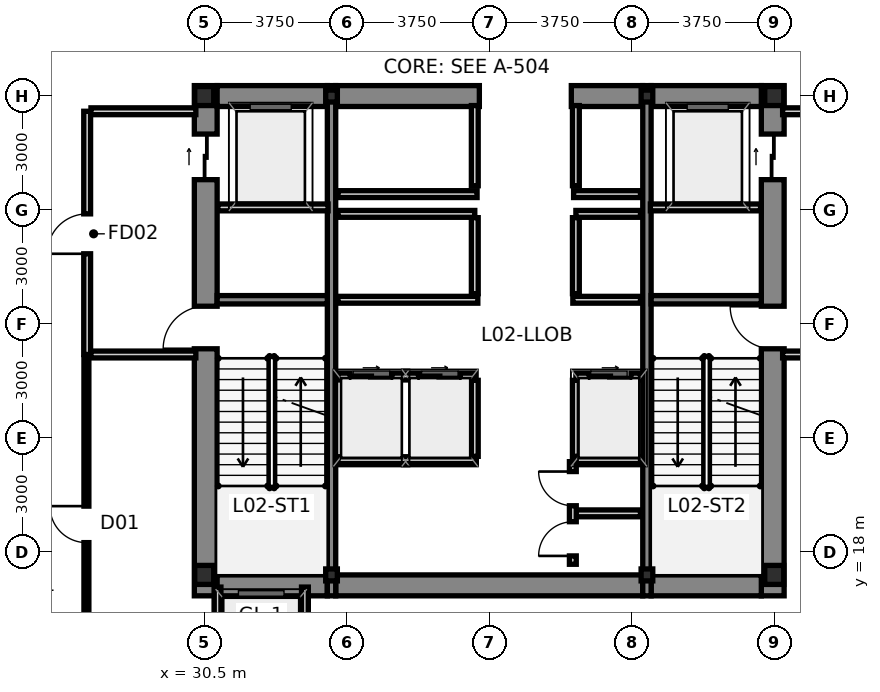
"""IFC4 building model, lengths in metres.
Left out: names, types, materials, properties, quantities, classifications, styles, units other than length and angle.
Written with IfcOpenShell. Run it as: python <this file> out.ifc"""

import sys

from ifc_helpers import new_model, si_unit, direction, frame, frame_2d, origin, origin_2d, place, context, subcontext, project, spatial, rectangle, i_section, extrude, source, transform, mapped, element, fill, save


model = new_model("IFC4")
c1 = context("Model", 3, precision=1e-05, world=origin(), true_north=direction((0.0, 1.0)))
c2 = subcontext(c1, "Body", "Model", "MODEL_VIEW")
j1 = project(units=[si_unit("LENGTHUNIT", "METRE"), si_unit("PLANEANGLEUNIT", "RADIAN")], contexts=[c1])
p1 = place(None, origin())
s1 = spatial("IfcSite", under=j1, at=p1, CompositionType="ELEMENT")
p2 = place(p1, origin())
s2 = spatial("IfcBuilding", under=s1, at=p2, CompositionType="ELEMENT")
p3 = place(p2, frame((0.0, 0.0, 10.2)))
s3 = spatial("IfcBuildingStorey", under=s2, at=p3, CompositionType="ELEMENT", Elevation=10.2)
m1 = source(origin(), c2, "Body", "SweptSolid", [
    extrude(i_section(OverallWidth=0.5, OverallDepth=0.5, WebThickness=0.028, FlangeThickness=0.04, at=origin_2d()), origin(), (0.0, 0.0, 1.0), 4.5),
])
for number, where, z_axis, x_axis in (
    (1, (30.5, 17.4, 0.0), (0.0, 0.0, 1.0), (1.0, 0.0, 0.0)),
    (2, (45.5, 17.4, 0.0), (0.0, 0.0, 1.0), (1.0, 0.0, 0.0)),
    (3, (45.5, 30.0, 0.0), (0.0, 0.0, 1.0), (1.0, 0.0, 0.0)),
    (4, (30.5, 30.0, 0.0), (0.0, 0.0, 1.0), (1.0, 0.0, 0.0)),
):
    element("IfcColumn", number, at=place(p3, frame(where, z_axis=z_axis, x_axis=x_axis)), inside=s3, PredefinedType="COLUMN", context=c2, shape_type="MappedRepresentation", body=[
        mapped(m1, transform((0.0, 0.0, 0.0), scale=1.0)),
    ])
m2 = source(origin(), c2, "Body", "SweptSolid", [
    extrude(i_section(OverallWidth=0.307, OverallDepth=0.315, WebThickness=0.012, FlangeThickness=0.019, at=origin_2d()), origin(), (0.0, 0.0, 1.0), 4.5),
])
for number, where, z_axis, x_axis in (
    (5, (33.85, 17.4, 0.0), (0.0, 0.0, 1.0), (1.0, 0.0, 0.0)),
    (6, (42.15, 17.4, 0.0), (0.0, 0.0, 1.0), (1.0, 0.0, 0.0)),
    (7, (33.85, 30.0, 0.0), (0.0, 0.0, 1.0), (1.0, 0.0, 0.0)),
    (8, (42.15, 30.0, 0.0), (0.0, 0.0, 1.0), (1.0, 0.0, 0.0)),
):
    element("IfcColumn", number, at=place(p3, frame(where, z_axis=z_axis, x_axis=x_axis)), inside=s3, PredefinedType="COLUMN", context=c2, shape_type="MappedRepresentation", body=[
        mapped(m2, transform((0.0, 0.0, 0.0), scale=1.0)),
    ])
p4 = place(p3, frame((30.54, 16.85, 0.0), z_axis=(0.0, 0.0, 1.0), x_axis=(0.0, 1.0, 0.0)))
e9 = element("IfcWall", 9, at=p4, inside=s3, PredefinedType="SHEAR", context=c2, shape_type="SweptSolid", body=[
    extrude(rectangle(XDim=13.425, YDim=0.6, at=frame_2d((6.712, 0.0))), origin(), (0.0, 0.0, 1.0), 4.5),
])
p5 = place(p4, frame((6.5, 0.0, 0.0)))
e10 = element("IfcOpeningElement", 10, at=p5, cuts=e9, PredefinedType="OPENING", context=c2, shape_type="SweptSolid", body=[
    extrude(rectangle(XDim=1.12, YDim=2.15, at=frame_2d((0.56, 1.075))), frame((0.0, 0.312, 0.0), z_axis=(0.0, -1.0, 0.0), x_axis=(1.0, 0.0, 0.0)), (0.0, 0.0, 1.0), 0.624),
])
p6 = place(p4, frame((10.95, 0.0, 0.0)))
e11 = element("IfcOpeningElement", 11, at=p6, cuts=e9, PredefinedType="OPENING", context=c2, shape_type="SweptSolid", body=[
    extrude(rectangle(XDim=1.2, YDim=2.2, at=frame_2d((0.6, 1.1))), frame((0.0, 0.312, 0.0), z_axis=(0.0, -1.0, 0.0), x_axis=(1.0, 0.0, 0.0)), (0.0, 0.0, 1.0), 0.624),
])
p7 = place(p3, frame((45.46, 16.85, 0.0), z_axis=(0.0, 0.0, 1.0), x_axis=(0.0, 1.0, 0.0)))
e12 = element("IfcWall", 12, at=p7, inside=s3, PredefinedType="SHEAR", context=c2, shape_type="SweptSolid", body=[
    extrude(rectangle(XDim=13.425, YDim=0.6, at=frame_2d((6.712, 0.0))), origin(), (0.0, 0.0, 1.0), 4.5),
])
p8 = place(p7, frame((6.5, 0.0, 0.0)))
e13 = element("IfcOpeningElement", 13, at=p8, cuts=e12, PredefinedType="OPENING", context=c2, shape_type="SweptSolid", body=[
    extrude(rectangle(XDim=1.12, YDim=2.15, at=frame_2d((0.56, 1.075))), frame((0.0, 0.312, 0.0), z_axis=(0.0, -1.0, 0.0), x_axis=(1.0, 0.0, 0.0)), (0.0, 0.0, 1.0), 0.624),
])
p9 = place(p7, frame((10.95, 0.0, 0.0)))
e14 = element("IfcOpeningElement", 14, at=p9, cuts=e12, PredefinedType="OPENING", context=c2, shape_type="SweptSolid", body=[
    extrude(rectangle(XDim=1.2, YDim=2.2, at=frame_2d((0.6, 1.1))), frame((0.0, 0.312, 0.0), z_axis=(0.0, -1.0, 0.0), x_axis=(1.0, 0.0, 0.0)), (0.0, 0.0, 1.0), 0.624),
])
p10 = place(p3, frame((30.84, 17.125, 0.0), z_axis=(0.0, 0.0, 1.0), x_axis=(1.0, 0.0, 0.0)))
e15 = element("IfcWall", 15, at=p10, inside=s3, PredefinedType="SHEAR", context=c2, shape_type="SweptSolid", body=[
    extrude(rectangle(XDim=2.9, YDim=0.55, at=frame_2d((1.45, 0.0))), origin(), (0.0, 0.0, 1.0), 4.5),
])
p11 = place(p3, frame((33.96, 17.125, 0.0), z_axis=(0.0, 0.0, 1.0), x_axis=(1.0, 0.0, 0.0)))
e16 = element("IfcWall", 16, at=p11, inside=s3, PredefinedType="SHEAR", context=c2, shape_type="SweptSolid", body=[
    extrude(rectangle(XDim=8.08, YDim=0.55, at=frame_2d((4.04, 0.0))), origin(), (0.0, 0.0, 1.0), 4.5),
])
for number, where, z_axis, x_axis in (
    (17, (42.26, 17.125, 0.0), (0.0, 0.0, 1.0), (1.0, 0.0, 0.0)),
    (18, (30.84, 30.0, 0.0), (0.0, 0.0, 1.0), (1.0, 0.0, 0.0)),
):
    element("IfcWall", number, at=place(p3, frame(where, z_axis=z_axis, x_axis=x_axis)), inside=s3, PredefinedType="SHEAR", context=c2, shape_type="SweptSolid", body=[
        extrude(rectangle(XDim=2.9, YDim=0.55, at=frame_2d((1.45, 0.0))), origin(), (0.0, 0.0, 1.0), 4.5),
    ])
p12 = place(p3, frame((33.96, 30.0, 0.0), z_axis=(0.0, 0.0, 1.0), x_axis=(1.0, 0.0, 0.0)))
e19 = element("IfcWall", 19, at=p12, inside=s3, PredefinedType="SHEAR", context=c2, shape_type="SweptSolid", body=[
    extrude(rectangle(XDim=3.78, YDim=0.55, at=frame_2d((1.89, 0.0))), origin(), (0.0, 0.0, 1.0), 4.5),
])
p13 = place(p3, frame((40.16, 30.0, 0.0), z_axis=(0.0, 0.0, 1.0), x_axis=(1.0, 0.0, 0.0)))
e20 = element("IfcWall", 20, at=p13, inside=s3, PredefinedType="SHEAR", context=c2, shape_type="SweptSolid", body=[
    extrude(rectangle(XDim=1.88, YDim=0.55, at=frame_2d((0.94, 0.0))), origin(), (0.0, 0.0, 1.0), 4.5),
])
p14 = place(p3, frame((42.26, 30.0, 0.0), z_axis=(0.0, 0.0, 1.0), x_axis=(1.0, 0.0, 0.0)))
e21 = element("IfcWall", 21, at=p14, inside=s3, PredefinedType="SHEAR", context=c2, shape_type="SweptSolid", body=[
    extrude(rectangle(XDim=2.9, YDim=0.55, at=frame_2d((1.45, 0.0))), origin(), (0.0, 0.0, 1.0), 4.5),
])
for number, where, z_axis, x_axis in (
    (22, (33.85, 16.85, 0.0), (0.0, 0.0, 1.0), (0.0, 1.0, 0.0)),
    (23, (42.15, 16.85, 0.0), (0.0, 0.0, 1.0), (0.0, 1.0, 0.0)),
):
    element("IfcWall", number, at=place(p3, frame(where, z_axis=z_axis, x_axis=x_axis)), inside=s3, PredefinedType="SHEAR", context=c2, shape_type="SweptSolid", body=[
        extrude(rectangle(XDim=13.425, YDim=0.22, at=frame_2d((6.712, 0.0))), origin(), (0.0, 0.0, 1.0), 4.5),
    ])
for number, where, z_axis, x_axis in (
    (24, (30.84, 24.64, 0.0), (0.0, 0.0, 1.0), (1.0, 0.0, 0.0)),
    (25, (42.26, 24.64, 0.0), (0.0, 0.0, 1.0), (1.0, 0.0, 0.0)),
):
    element("IfcWall", number, at=place(p3, frame(where, z_axis=z_axis, x_axis=x_axis)), inside=s3, PredefinedType="SHEAR", context=c2, shape_type="SweptSolid", body=[
        extrude(rectangle(XDim=2.9, YDim=0.22, at=frame_2d((1.45, 0.0))), origin(), (0.0, 0.0, 1.0), 4.5),
    ])
p15 = place(p3, frame((30.85, 14.42, 0.0), z_axis=(0.0, 0.0, 1.0), x_axis=(0.0, 1.0, 0.0)))
e26 = element("IfcWall", 26, at=p15, inside=s3, PredefinedType="PARTITIONING", context=c2, shape_type="SweptSolid", body=[
    extrude(rectangle(XDim=2.66, YDim=0.18, at=frame_2d((1.33, 0.0))), origin(), (0.0, 0.0, 1.0), 3.553),
])
p16 = place(p3, frame((33.15, 14.42, 0.0), z_axis=(0.0, 0.0, 1.0), x_axis=(0.0, 1.0, 0.0)))
e27 = element("IfcWall", 27, at=p16, inside=s3, PredefinedType="PARTITIONING", context=c2, shape_type="SweptSolid", body=[
    extrude(rectangle(XDim=2.66, YDim=0.18, at=frame_2d((1.33, 0.0))), origin(), (0.0, 0.0, 1.0), 4.18),
])
p17 = place(p3, frame((34.02, 22.62, 0.0), z_axis=(0.0, 0.0, 1.0), x_axis=(1.0, 0.0, 0.0)))
e28 = element("IfcWall", 28, at=p17, inside=s3, PredefinedType="PARTITIONING", context=c2, shape_type="SweptSolid", body=[
    extrude(rectangle(XDim=3.6, YDim=0.18, at=frame_2d((1.8, 0.0))), origin(), (0.0, 0.0, 1.0), 4.18),
])
p18 = place(p17, frame((0.32, 0.0, 0.0)))
e29 = element("IfcOpeningElement", 29, at=p18, cuts=e28, PredefinedType="OPENING", context=c2, shape_type="SweptSolid", body=[
    extrude(rectangle(XDim=1.1, YDim=2.2, at=frame_2d((0.55, 1.1))), frame((0.0, 0.102, 0.0), z_axis=(0.0, -1.0, 0.0), x_axis=(1.0, 0.0, 0.0)), (0.0, 0.0, 1.0), 0.204),
])
p19 = place(p17, frame((2.12, 0.0, 0.0)))
e30 = element("IfcOpeningElement", 30, at=p19, cuts=e28, PredefinedType="OPENING", context=c2, shape_type="SweptSolid", body=[
    extrude(rectangle(XDim=1.1, YDim=2.2, at=frame_2d((0.55, 1.1))), frame((0.0, 0.102, 0.0), z_axis=(0.0, -1.0, 0.0), x_axis=(1.0, 0.0, 0.0)), (0.0, 0.0, 1.0), 0.204),
])
p20 = place(p3, frame((40.28, 22.62, 0.0), z_axis=(0.0, 0.0, 1.0), x_axis=(1.0, 0.0, 0.0)))
e31 = element("IfcWall", 31, at=p20, inside=s3, PredefinedType="PARTITIONING", context=c2, shape_type="SweptSolid", body=[
    extrude(rectangle(XDim=1.7, YDim=0.18, at=frame_2d((0.85, 0.0))), origin(), (0.0, 0.0, 1.0), 4.18),
])
p21 = place(p20, frame((0.35, 0.0, 0.0)))
e32 = element("IfcOpeningElement", 32, at=p21, cuts=e31, PredefinedType="OPENING", context=c2, shape_type="SweptSolid", body=[
    extrude(rectangle(XDim=1.1, YDim=2.2, at=frame_2d((0.55, 1.1))), frame((0.0, 0.102, 0.0), z_axis=(0.0, -1.0, 0.0), x_axis=(1.0, 0.0, 0.0)), (0.0, 0.0, 1.0), 0.204),
])
for number, where, z_axis, x_axis in (
    (33, (37.62, 20.52, 0.0), (0.0, 0.0, 1.0), (0.0, 1.0, 0.0)),
    (34, (40.28, 20.52, 0.0), (0.0, 0.0, 1.0), (0.0, 1.0, 0.0)),
):
    element("IfcWall", number, at=place(p3, frame(where, z_axis=z_axis, x_axis=x_axis)), inside=s3, PredefinedType="PARTITIONING", context=c2, shape_type="SweptSolid", body=[
        extrude(rectangle(XDim=2.0, YDim=0.18, at=frame_2d((1.0, 0.0))), origin(), (0.0, 0.0, 1.0), 4.18),
    ])
p22 = place(p3, frame((34.02, 26.9, 0.0), z_axis=(0.0, 0.0, 1.0), x_axis=(1.0, 0.0, 0.0)))
e35 = element("IfcWall", 35, at=p22, inside=s3, PredefinedType="PARTITIONING", context=c2, shape_type="SweptSolid", body=[
    extrude(rectangle(XDim=3.6, YDim=0.18, at=frame_2d((1.8, 0.0))), origin(), (0.0, 0.0, 1.0), 4.18),
])
p23 = place(p3, frame((40.28, 26.9, 0.0), z_axis=(0.0, 0.0, 1.0), x_axis=(1.0, 0.0, 0.0)))
e36 = element("IfcWall", 36, at=p23, inside=s3, PredefinedType="PARTITIONING", context=c2, shape_type="SweptSolid", body=[
    extrude(rectangle(XDim=1.7, YDim=0.18, at=frame_2d((0.85, 0.0))), origin(), (0.0, 0.0, 1.0), 4.18),
])
for number, where, z_axis, x_axis in (
    (37, (37.62, 24.8, 0.0), (0.0, 0.0, 1.0), (0.0, 1.0, 0.0)),
    (38, (40.28, 24.8, 0.0), (0.0, 0.0, 1.0), (0.0, 1.0, 0.0)),
):
    element("IfcWall", number, at=place(p3, frame(where, z_axis=z_axis, x_axis=x_axis)), inside=s3, PredefinedType="PARTITIONING", context=c2, shape_type="SweptSolid", body=[
        extrude(rectangle(XDim=2.0, YDim=0.18, at=frame_2d((1.0, 0.0))), origin(), (0.0, 0.0, 1.0), 4.18),
    ])
p24 = place(p3, frame((34.02, 24.64, 0.0), z_axis=(0.0, 0.0, 1.0), x_axis=(1.0, 0.0, 0.0)))
e39 = element("IfcWall", 39, at=p24, inside=s3, PredefinedType="PARTITIONING", context=c2, shape_type="SweptSolid", body=[
    extrude(rectangle(XDim=3.68, YDim=0.18, at=frame_2d((1.84, 0.0))), origin(), (0.0, 0.0, 1.0), 4.18),
])
p25 = place(p3, frame((40.2, 24.64, 0.0), z_axis=(0.0, 0.0, 1.0), x_axis=(1.0, 0.0, 0.0)))
e40 = element("IfcWall", 40, at=p25, inside=s3, PredefinedType="PARTITIONING", context=c2, shape_type="SweptSolid", body=[
    extrude(rectangle(XDim=1.78, YDim=0.18, at=frame_2d((0.89, 0.0))), origin(), (0.0, 0.0, 1.0), 4.18),
])
p26 = place(p3, frame((34.02, 27.42, 0.0), z_axis=(0.0, 0.0, 1.0), x_axis=(1.0, 0.0, 0.0)))
e41 = element("IfcWall", 41, at=p26, inside=s3, PredefinedType="PARTITIONING", context=c2, shape_type="SweptSolid", body=[
    extrude(rectangle(XDim=3.66, YDim=0.18, at=frame_2d((1.83, 0.0))), origin(), (0.0, 0.0, 1.0), 4.18),
])
p27 = place(p3, frame((40.22, 27.42, 0.0), z_axis=(0.0, 0.0, 1.0), x_axis=(1.0, 0.0, 0.0)))
e42 = element("IfcWall", 42, at=p27, inside=s3, PredefinedType="PARTITIONING", context=c2, shape_type="SweptSolid", body=[
    extrude(rectangle(XDim=1.76, YDim=0.18, at=frame_2d((0.88, 0.0))), origin(), (0.0, 0.0, 1.0), 4.18),
])
for number, where, z_axis, x_axis in (
    (43, (37.62, 27.64, 0.0), (0.0, 0.0, 1.0), (0.0, 1.0, 0.0)),
    (44, (40.28, 27.64, 0.0), (0.0, 0.0, 1.0), (0.0, 1.0, 0.0)),
):
    element("IfcWall", number, at=place(p3, frame(where, z_axis=z_axis, x_axis=x_axis)), inside=s3, PredefinedType="PARTITIONING", context=c2, shape_type="SweptSolid", body=[
        extrude(rectangle(XDim=2.11, YDim=0.18, at=frame_2d((1.055, 0.0))), origin(), (0.0, 0.0, 1.0), 4.18),
    ])
p28 = place(p3, frame((27.42, 23.2, 0.0), z_axis=(0.0, 0.0, 1.0), x_axis=(0.0, 1.0, 0.0)))
e45 = element("IfcWall", 45, at=p28, inside=s3, PredefinedType="PARTITIONING", context=c2, shape_type="SweptSolid", body=[
    extrude(rectangle(XDim=6.4, YDim=0.18, at=frame_2d((3.2, 0.0))), origin(), (0.0, 0.0, 1.0), 3.806),
])
p29 = place(p28, frame((2.65, 0.0, 0.0)))
e46 = element("IfcOpeningElement", 46, at=p29, cuts=e45, PredefinedType="OPENING", context=c2, shape_type="SweptSolid", body=[
    extrude(rectangle(XDim=1.05, YDim=2.15, at=frame_2d((0.525, 1.075))), frame((0.0, 0.102, 0.0), z_axis=(0.0, -1.0, 0.0), x_axis=(1.0, 0.0, 0.0)), (0.0, 0.0, 1.0), 0.204),
])
p30 = place(p3, frame((27.52, 23.2, 0.0), z_axis=(0.0, 0.0, 1.0), x_axis=(1.0, 0.0, 0.0)))
e47 = element("IfcWall", 47, at=p30, inside=s3, PredefinedType="PARTITIONING", context=c2, shape_type="SweptSolid", body=[
    extrude(rectangle(XDim=2.76, YDim=0.18, at=frame_2d((1.38, 0.0))), origin(), (0.0, 0.0, 1.0), 4.18),
])
p31 = place(p3, frame((27.52, 29.6, 0.0), z_axis=(0.0, 0.0, 1.0), x_axis=(1.0, 0.0, 0.0)))
e48 = element("IfcWall", 48, at=p31, inside=s3, PredefinedType="PARTITIONING", context=c2, shape_type="SweptSolid", body=[
    extrude(rectangle(XDim=2.76, YDim=0.18, at=frame_2d((1.38, 0.0))), origin(), (0.0, 0.0, 1.0), 3.553),
])
p32 = place(p3, frame((45.72, 23.2, 0.0), z_axis=(0.0, 0.0, 1.0), x_axis=(1.0, 0.0, 0.0)))
e49 = element("IfcWall", 49, at=p32, inside=s3, PredefinedType="PARTITIONING", context=c2, shape_type="SweptSolid", body=[
    extrude(rectangle(XDim=2.76, YDim=0.18, at=frame_2d((1.38, 0.0))), origin(), (0.0, 0.0, 1.0), 4.18),
])
p33 = place(p3, frame((45.72, 29.6, 0.0), z_axis=(0.0, 0.0, 1.0), x_axis=(1.0, 0.0, 0.0)))
e50 = element("IfcWall", 50, at=p33, inside=s3, PredefinedType="PARTITIONING", context=c2, shape_type="SweptSolid", body=[
    extrude(rectangle(XDim=2.76, YDim=0.18, at=frame_2d((1.38, 0.0))), origin(), (0.0, 0.0, 1.0), 3.553),
])
for number, where, z_axis, x_axis in (
    (51, (30.86, 27.07, 0.0), (0.0, 0.0, 1.0), (1.0, 0.0, 0.0)),
    (52, (42.24, 27.07, 0.0), (0.0, 0.0, 1.0), (1.0, 0.0, 0.0)),
):
    element("IfcWall", number, at=place(p3, frame(where, z_axis=z_axis, x_axis=x_axis)), inside=s3, PredefinedType="PARTITIONING", context=c2, shape_type="SweptSolid", body=[
        extrude(rectangle(XDim=2.9, YDim=0.18, at=frame_2d((1.45, 0.0))), origin(), (0.0, 0.0, 1.0), 4.18),
    ])
p34 = place(p3, frame((34.02, 20.42, 0.0), z_axis=(0.0, 0.0, 1.0), x_axis=(1.0, 0.0, 0.0)))
e53 = element("IfcWall", 53, at=p34, inside=s3, PredefinedType="PARTITIONING", context=c2, shape_type="SweptSolid", body=[
    extrude(rectangle(XDim=3.64, YDim=0.18, at=frame_2d((1.82, 0.0))), origin(), (0.0, 0.0, 1.0), 4.18),
])
p35 = place(p3, frame((40.22, 20.42, 0.0), z_axis=(0.0, 0.0, 1.0), x_axis=(1.0, 0.0, 0.0)))
e54 = element("IfcWall", 54, at=p35, inside=s3, PredefinedType="PARTITIONING", context=c2, shape_type="SweptSolid", body=[
    extrude(rectangle(XDim=1.76, YDim=0.18, at=frame_2d((0.88, 0.0))), origin(), (0.0, 0.0, 1.0), 4.18),
])
p36 = place(p3, frame((40.28, 19.02, 0.0), z_axis=(0.0, 0.0, 1.0), x_axis=(1.0, 0.0, 0.0)))
e55 = element("IfcWall", 55, at=p36, inside=s3, PredefinedType="PARTITIONING", context=c2, shape_type="SweptSolid", body=[
    extrude(rectangle(XDim=1.7, YDim=0.18, at=frame_2d((0.85, 0.0))), origin(), (0.0, 0.0, 1.0), 4.18),
])
p37 = place(p3, frame((40.2, 17.68, 0.0), z_axis=(0.0, 0.0, 1.0), x_axis=(0.0, 1.0, 0.0)))
e56 = element("IfcWall", 56, at=p37, inside=s3, PredefinedType="PARTITIONING", context=c2, shape_type="SweptSolid", body=[
    extrude(rectangle(XDim=2.7, YDim=0.18, at=frame_2d((1.35, 0.0))), origin(), (0.0, 0.0, 1.0), 4.18),
])
p38 = place(p37, frame((0.22, 0.0, 0.0)))
e57 = element("IfcOpeningElement", 57, at=p38, cuts=e56, PredefinedType="OPENING", context=c2, shape_type="SweptSolid", body=[
    extrude(rectangle(XDim=0.9, YDim=2.1, at=frame_2d((0.45, 1.05))), frame((0.0, 0.102, 0.0), z_axis=(0.0, -1.0, 0.0), x_axis=(1.0, 0.0, 0.0)), (0.0, 0.0, 1.0), 0.204),
])
p39 = place(p37, frame((1.54, 0.0, 0.0)))
e58 = element("IfcOpeningElement", 58, at=p39, cuts=e56, PredefinedType="OPENING", context=c2, shape_type="SweptSolid", body=[
    extrude(rectangle(XDim=0.9, YDim=2.1, at=frame_2d((0.45, 1.05))), frame((0.0, 0.102, 0.0), z_axis=(0.0, -1.0, 0.0), x_axis=(1.0, 0.0, 0.0)), (0.0, 0.0, 1.0), 0.204),
])
p40 = place(p3, frame((27.4, 14.355, 0.0), z_axis=(0.0, 0.0, 1.0), x_axis=(0.0, 1.0, 0.0)))
e59 = element("IfcWall", 59, at=p40, inside=s3, PredefinedType="PARTITIONING", context=c2, shape_type="SweptSolid", body=[
    extrude(rectangle(XDim=8.75, YDim=0.13, at=frame_2d((4.375, 0.0))), origin(), (0.0, 0.0, 1.0), 3.806),
])
p41 = place(p40, frame((3.895, 0.0, 0.0)))
e60 = element("IfcOpeningElement", 60, at=p41, cuts=e59, PredefinedType="OPENING", context=c2, shape_type="SweptSolid", body=[
    extrude(rectangle(XDim=0.96, YDim=2.15, at=frame_2d((0.48, 1.075))), frame((0.0, 0.077, 0.0), z_axis=(0.0, -1.0, 0.0), x_axis=(1.0, 0.0, 0.0)), (0.0, 0.0, 1.0), 0.154),
])
p42 = place(p5, origin())
e61 = element("IfcDoor", 61, at=p42, inside=s3, OperationType="SINGLE_SWING_LEFT", PredefinedType="DOOR", context=c2, shape_type="SweptSolid", body=[
    extrude(rectangle(XDim=1.12, YDim=2.15, at=frame_2d((0.56, 1.075))), frame((0.0, 0.025, 0.0), z_axis=(0.0, -1.0, 0.0), x_axis=(1.0, 0.0, 0.0)), (0.0, 0.0, 1.0), 0.05),
])
fill(e10, e61)
p43 = place(p6, origin())
e62 = element("IfcDoor", 62, at=p43, inside=s3, OperationType="SLIDING_TO_LEFT", PredefinedType="DOOR", context=c2, shape_type="SweptSolid", body=[
    extrude(rectangle(XDim=1.2, YDim=2.2, at=frame_2d((0.6, 1.1))), frame((0.0, 0.025, 0.0), z_axis=(0.0, -1.0, 0.0), x_axis=(1.0, 0.0, 0.0)), (0.0, 0.0, 1.0), 0.05),
])
fill(e11, e62)
p44 = place(p8, origin())
e63 = element("IfcDoor", 63, at=p44, inside=s3, OperationType="SINGLE_SWING_RIGHT", PredefinedType="DOOR", context=c2, shape_type="SweptSolid", body=[
    extrude(rectangle(XDim=1.12, YDim=2.15, at=frame_2d((0.56, 1.075))), frame((0.0, 0.025, 0.0), z_axis=(0.0, -1.0, 0.0), x_axis=(1.0, 0.0, 0.0)), (0.0, 0.0, 1.0), 0.05),
])
fill(e13, e63)
p45 = place(p9, origin())
e64 = element("IfcDoor", 64, at=p45, inside=s3, OperationType="SLIDING_TO_RIGHT", PredefinedType="DOOR", context=c2, shape_type="SweptSolid", body=[
    extrude(rectangle(XDim=1.2, YDim=2.2, at=frame_2d((0.6, 1.1))), frame((0.0, 0.025, 0.0), z_axis=(0.0, -1.0, 0.0), x_axis=(1.0, 0.0, 0.0)), (0.0, 0.0, 1.0), 0.05),
])
fill(e14, e64)
p46 = place(p18, origin())
e65 = element("IfcDoor", 65, at=p46, inside=s3, OperationType="SLIDING_TO_LEFT", PredefinedType="DOOR", context=c2, shape_type="SweptSolid", body=[
    extrude(rectangle(XDim=1.1, YDim=2.2, at=frame_2d((0.55, 1.1))), frame((0.0, 0.025, 0.0), z_axis=(0.0, -1.0, 0.0), x_axis=(1.0, 0.0, 0.0)), (0.0, 0.0, 1.0), 0.05),
])
fill(e29, e65)
p47 = place(p19, origin())
e66 = element("IfcDoor", 66, at=p47, inside=s3, OperationType="SLIDING_TO_RIGHT", PredefinedType="DOOR", context=c2, shape_type="SweptSolid", body=[
    extrude(rectangle(XDim=1.1, YDim=2.2, at=frame_2d((0.55, 1.1))), frame((0.0, 0.025, 0.0), z_axis=(0.0, -1.0, 0.0), x_axis=(1.0, 0.0, 0.0)), (0.0, 0.0, 1.0), 0.05),
])
fill(e30, e66)
p48 = place(p21, origin())
e67 = element("IfcDoor", 67, at=p48, inside=s3, OperationType="SLIDING_TO_LEFT", PredefinedType="DOOR", context=c2, shape_type="SweptSolid", body=[
    extrude(rectangle(XDim=1.1, YDim=2.2, at=frame_2d((0.55, 1.1))), frame((0.0, 0.025, 0.0), z_axis=(0.0, -1.0, 0.0), x_axis=(1.0, 0.0, 0.0)), (0.0, 0.0, 1.0), 0.05),
])
fill(e32, e67)
p49 = place(p29, origin())
e68 = element("IfcDoor", 68, at=p49, inside=s3, OperationType="SINGLE_SWING_LEFT", PredefinedType="DOOR", context=c2, shape_type="SweptSolid", body=[
    extrude(rectangle(XDim=1.05, YDim=2.15, at=frame_2d((0.525, 1.075))), frame((0.0, 0.025, 0.0), z_axis=(0.0, -1.0, 0.0), x_axis=(1.0, 0.0, 0.0)), (0.0, 0.0, 1.0), 0.05),
])
fill(e46, e68)
p50 = place(p38, origin())
e69 = element("IfcDoor", 69, at=p50, inside=s3, OperationType="SINGLE_SWING_LEFT", PredefinedType="DOOR", context=c2, shape_type="SweptSolid", body=[
    extrude(rectangle(XDim=0.9, YDim=2.1, at=frame_2d((0.45, 1.05))), frame((0.0, 0.025, 0.0), z_axis=(0.0, -1.0, 0.0), x_axis=(1.0, 0.0, 0.0)), (0.0, 0.0, 1.0), 0.05),
])
fill(e57, e69)
p51 = place(p39, origin())
e70 = element("IfcDoor", 70, at=p51, inside=s3, OperationType="SINGLE_SWING_RIGHT", PredefinedType="DOOR", context=c2, shape_type="SweptSolid", body=[
    extrude(rectangle(XDim=0.9, YDim=2.1, at=frame_2d((0.45, 1.05))), frame((0.0, 0.025, 0.0), z_axis=(0.0, -1.0, 0.0), x_axis=(1.0, 0.0, 0.0)), (0.0, 0.0, 1.0), 0.05),
])
fill(e58, e70)
p52 = place(p41, origin())
e71 = element("IfcDoor", 71, at=p52, inside=s3, OperationType="SINGLE_SWING_RIGHT", PredefinedType="DOOR", context=c2, shape_type="SweptSolid", body=[
    extrude(rectangle(XDim=0.96, YDim=2.15, at=frame_2d((0.48, 1.075))), frame((0.0, 0.025, 0.0), z_axis=(0.0, -1.0, 0.0), x_axis=(1.0, 0.0, 0.0)), (0.0, 0.0, 1.0), 0.05),
])
fill(e60, e71)
save(model, sys.argv[1])
